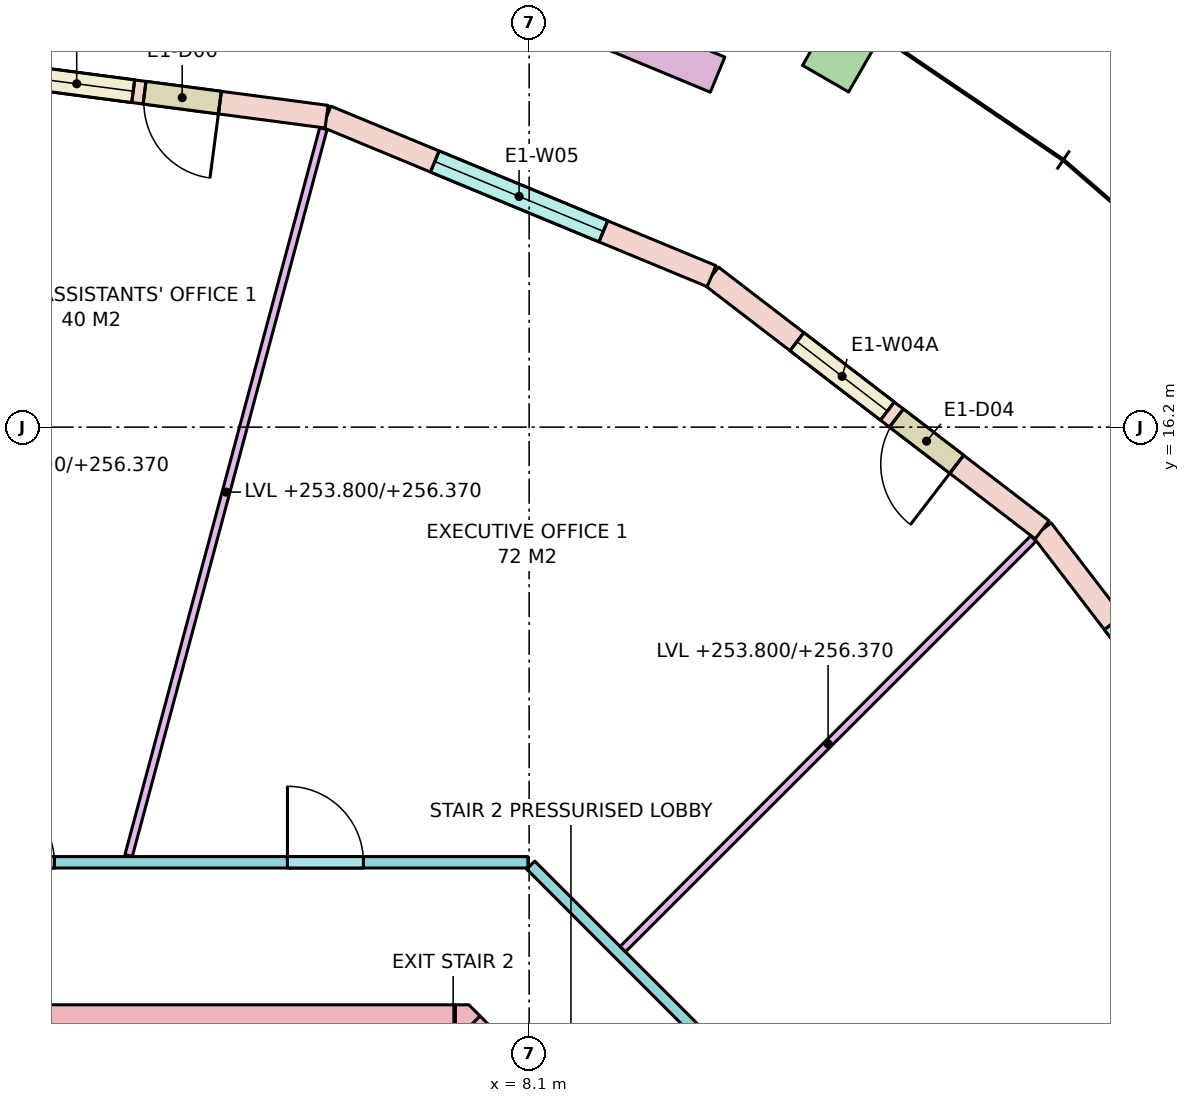
"""IFC4 building model, lengths in metres.
Left out: names, types, materials, properties, quantities, classifications, styles, units other than length and angle.
Written with IfcOpenShell. Run it as: python <this file> out.ifc"""

import sys

from ifc_helpers import new_model, si_unit, direction, frame, frame_2d, origin, origin_2d, place, context, subcontext, project, spatial, polyline, rectangle, outline, extrude, element, fill, save


model = new_model("IFC4")
c1 = context("Model", 3, precision=1e-05, world=origin(), true_north=direction((0.0, 1.0)))
c2 = subcontext(c1, "Body", "Model", "MODEL_VIEW")
j1 = project(units=[si_unit("LENGTHUNIT", "METRE"), si_unit("PLANEANGLEUNIT", "RADIAN")], contexts=[c1])
p1 = place(None, origin())
s1 = spatial("IfcSite", under=j1, at=p1, CompositionType="ELEMENT")
p2 = place(p1, origin())
s2 = spatial("IfcBuilding", under=s1, at=p2, CompositionType="ELEMENT")
p3 = place(p2, frame((0.0, 0.0, 253.8)))
s3 = spatial("IfcBuildingStorey", under=s2, at=p3, CompositionType="ELEMENT", Elevation=253.8)
p4 = place(p3, frame((12.25, 21.218, 0.0), z_axis=(0.0, 0.0, 1.0), x_axis=(-0.866025403784, 0.5, 0.0)))
e1 = element("IfcColumn", 1, at=p4, inside=s3, PredefinedType="COLUMN", context=c2, shape_type="SweptSolid", body=[
    extrude(rectangle(XDim=0.7, YDim=1.0, at=origin_2d()), origin(), (0.0, 0.0, 1.0), 3.7),
])
p5 = place(p3, frame((-7.13, 8.35, -0.28), z_axis=(0.0, 0.0, 1.0), x_axis=(1.0, 0.0, 0.0)))
e2 = element("IfcWall", 2, at=p5, inside=s3, PredefinedType="SHEAR", context=c2, shape_type="SweptSolid", body=[
    extrude(rectangle(XDim=14.26, YDim=0.5, at=frame_2d((7.13, 0.0))), origin(), (0.0, 0.0, 1.0), 3.7),
])
p6 = place(p5, frame((5.48, 0.0, 0.28)))
e3 = element("IfcOpeningElement", 3, at=p6, cuts=e2, PredefinedType="OPENING", context=c2, shape_type="SweptSolid", body=[
    extrude(rectangle(XDim=0.7, YDim=2.1, at=frame_2d((0.35, 1.05))), frame((0.0, 0.26, 0.0), z_axis=(0.0, -1.0, 0.0), x_axis=(1.0, 0.0, 0.0)), (0.0, 0.0, 1.0), 0.52),
])
p7 = place(p5, frame((6.53, 0.0, 0.28)))
e4 = element("IfcOpeningElement", 4, at=p7, cuts=e2, PredefinedType="OPENING", context=c2, shape_type="SweptSolid", body=[
    extrude(rectangle(XDim=0.85, YDim=2.1, at=frame_2d((0.425, 1.05))), frame((0.0, 0.26, 0.0), z_axis=(0.0, -1.0, 0.0), x_axis=(1.0, 0.0, 0.0)), (0.0, 0.0, 1.0), 0.52),
])
p8 = place(p5, frame((7.83, 0.0, 0.28)))
e5 = element("IfcOpeningElement", 5, at=p8, cuts=e2, PredefinedType="OPENING", context=c2, shape_type="SweptSolid", body=[
    extrude(rectangle(XDim=0.85, YDim=2.1, at=frame_2d((0.425, 1.05))), frame((0.0, 0.26, 0.0), z_axis=(0.0, -1.0, 0.0), x_axis=(1.0, 0.0, 0.0)), (0.0, 0.0, 1.0), 0.52),
])
p9 = place(p3, frame((7.277, 8.277, -0.28), z_axis=(0.0, 0.0, 1.0), x_axis=(0.707106781187, -0.707106781187, 0.0)))
e6 = element("IfcWall", 6, at=p9, inside=s3, PredefinedType="SHEAR", context=c2, shape_type="SweptSolid", body=[
    extrude(rectangle(XDim=4.243, YDim=0.5, at=frame_2d((2.121, 0.0))), origin(), (0.0, 0.0, 1.0), 3.7),
])
p10 = place(p9, frame((2.393, 0.0, 0.28)))
e7 = element("IfcOpeningElement", 7, at=p10, cuts=e6, PredefinedType="OPENING", context=c2, shape_type="SweptSolid", body=[
    extrude(rectangle(XDim=1.2, YDim=2.1, at=frame_2d((0.6, 1.05))), frame((0.0, 0.26, 0.0), z_axis=(0.0, -1.0, 0.0), x_axis=(1.0, 0.0, 0.0)), (0.0, 0.0, 1.0), 0.52),
])
p11 = place(p3, frame((0.0, 0.0, -0.28)))
e8 = element("IfcWall", 8, at=p11, inside=s3, PredefinedType="SHEAR", context=c2, shape_type="SweptSolid", body=[
    extrude(outline(polyline([(7.307, 8.6), (7.454, 8.454), (7.13, 8.13), (7.13, 8.6), (7.307, 8.6)])), origin(), (0.0, 0.0, 1.0), 3.7),
])
p12 = place(p3, frame((18.187, 10.5, 0.0), z_axis=(0.0, 0.0, 1.0), x_axis=(-0.608784891166, 0.793335336593, 0.0)))
e9 = element("IfcWall", 9, at=p12, inside=s3, PredefinedType="STANDARD", context=c2, shape_type="SweptSolid", body=[
    extrude(rectangle(XDim=5.482, YDim=0.3, at=frame_2d((2.741, 0.0))), origin(), (0.0, 0.0, 1.0), 3.42),
])
p13 = place(p12, frame((1.541, 0.0, 0.8)))
e10 = element("IfcOpeningElement", 10, at=p13, cuts=e9, PredefinedType="OPENING", context=c2, shape_type="SweptSolid", body=[
    extrude(rectangle(XDim=2.4, YDim=2.4, at=frame_2d((1.2, 1.2))), frame((0.0, 0.16, 0.0), z_axis=(0.0, -1.0, 0.0), x_axis=(1.0, 0.0, 0.0)), (0.0, 0.0, 1.0), 0.32),
])
p14 = place(p3, frame((14.849, 14.849, 0.0), z_axis=(0.0, 0.0, 1.0), x_axis=(-0.793335336593, 0.608784891166, 0.0)))
e11 = element("IfcWall", 11, at=p14, inside=s3, PredefinedType="STANDARD", context=c2, shape_type="SweptSolid", body=[
    extrude(rectangle(XDim=5.482, YDim=0.3, at=frame_2d((2.741, 0.0))), origin(), (0.0, 0.0, 1.0), 3.42),
])
p15 = place(p14, frame((1.416, 0.0, 0.0)))
e12 = element("IfcOpeningElement", 12, at=p15, cuts=e11, PredefinedType="OPENING", context=c2, shape_type="SweptSolid", body=[
    extrude(rectangle(XDim=1.0, YDim=2.4, at=frame_2d((0.5, 1.2))), frame((0.0, 0.16, 0.0), z_axis=(0.0, -1.0, 0.0), x_axis=(1.0, 0.0, 0.0)), (0.0, 0.0, 1.0), 0.32),
])
p16 = place(p14, frame((2.566, 0.0, 0.8)))
e13 = element("IfcOpeningElement", 13, at=p16, cuts=e11, PredefinedType="OPENING", context=c2, shape_type="SweptSolid", body=[
    extrude(rectangle(XDim=1.5, YDim=2.4, at=frame_2d((0.75, 1.2))), frame((0.0, 0.16, 0.0), z_axis=(0.0, -1.0, 0.0), x_axis=(1.0, 0.0, 0.0)), (0.0, 0.0, 1.0), 0.32),
])
p17 = place(p3, frame((10.5, 18.187, 0.0), z_axis=(0.0, 0.0, 1.0), x_axis=(-0.923877333662, 0.382688740813, 0.0)))
e14 = element("IfcWall", 14, at=p17, inside=s3, PredefinedType="STANDARD", context=c2, shape_type="SweptSolid", body=[
    extrude(rectangle(XDim=5.482, YDim=0.3, at=frame_2d((2.741, 0.0))), origin(), (0.0, 0.0, 1.0), 3.42),
])
p18 = place(p17, frame((1.541, 0.0, 0.8)))
e15 = element("IfcOpeningElement", 15, at=p18, cuts=e14, PredefinedType="OPENING", context=c2, shape_type="SweptSolid", body=[
    extrude(rectangle(XDim=2.4, YDim=2.4, at=frame_2d((1.2, 1.2))), frame((0.0, 0.16, 0.0), z_axis=(0.0, -1.0, 0.0), x_axis=(1.0, 0.0, 0.0)), (0.0, 0.0, 1.0), 0.32),
])
p19 = place(p3, frame((5.435, 20.284, 0.0), z_axis=(0.0, 0.0, 1.0), x_axis=(-0.991444743541, 0.130527087244, 0.0)))
e16 = element("IfcWall", 16, at=p19, inside=s3, PredefinedType="STANDARD", context=c2, shape_type="SweptSolid", body=[
    extrude(rectangle(XDim=5.482, YDim=0.3, at=frame_2d((2.741, 0.0))), origin(), (0.0, 0.0, 1.0), 3.42),
])
p20 = place(p19, frame((1.416, 0.0, 0.0)))
e17 = element("IfcOpeningElement", 17, at=p20, cuts=e16, PredefinedType="OPENING", context=c2, shape_type="SweptSolid", body=[
    extrude(rectangle(XDim=1.0, YDim=2.4, at=frame_2d((0.5, 1.2))), frame((0.0, 0.16, 0.0), z_axis=(0.0, -1.0, 0.0), x_axis=(1.0, 0.0, 0.0)), (0.0, 0.0, 1.0), 0.32),
])
p21 = place(p19, frame((2.566, 0.0, 0.8)))
e18 = element("IfcOpeningElement", 18, at=p21, cuts=e16, PredefinedType="OPENING", context=c2, shape_type="SweptSolid", body=[
    extrude(rectangle(XDim=1.5, YDim=2.4, at=frame_2d((0.75, 1.2))), frame((0.0, 0.16, 0.0), z_axis=(0.0, -1.0, 0.0), x_axis=(1.0, 0.0, 0.0)), (0.0, 0.0, 1.0), 0.32),
])
p22 = place(p3, frame((10.58, 20.838, 0.0), z_axis=(0.0, 0.0, 1.0), x_axis=(-0.923909393783, 0.382611332921, 0.0)))
e19 = element("IfcWall", 19, at=p22, inside=s3, PredefinedType="PARAPET", context=c2, shape_type="SweptSolid", body=[
    extrude(rectangle(XDim=3.6, YDim=0.5, at=frame_2d((1.8, 0.0))), origin(), (0.0, 0.0, 1.0), 0.9),
])
p23 = place(p3, frame((-8.084, 10.475, 0.0), z_axis=(0.0, 0.0, 1.0), x_axis=(1.0, 0.0, 0.0)))
e20 = element("IfcWall", 20, at=p23, inside=s3, PredefinedType="PARTITIONING", context=c2, shape_type="SweptSolid", body=[
    extrude(rectangle(XDim=16.167, YDim=0.15, at=frame_2d((8.084, 0.0))), origin(), (0.0, 0.0, 1.0), 2.57),
])
p24 = place(p23, frame((13.004, 0.0, 0.0)))
e21 = element("IfcOpeningElement", 21, at=p24, cuts=e20, PredefinedType="OPENING", context=c2, shape_type="SweptSolid", body=[
    extrude(rectangle(XDim=1.0, YDim=2.1, at=frame_2d((0.5, 1.05))), frame((0.0, 0.085, 0.0), z_axis=(0.0, -1.0, 0.0), x_axis=(1.0, 0.0, 0.0)), (0.0, 0.0, 1.0), 0.17),
])
p25 = place(p23, frame((9.038, 0.0, 0.0)))
e22 = element("IfcOpeningElement", 22, at=p25, cuts=e20, PredefinedType="OPENING", context=c2, shape_type="SweptSolid", body=[
    extrude(rectangle(XDim=0.9, YDim=2.1, at=frame_2d((0.45, 1.05))), frame((0.0, 0.085, 0.0), z_axis=(0.0, -1.0, 0.0), x_axis=(1.0, 0.0, 0.0)), (0.0, 0.0, 1.0), 0.17),
])
p26 = place(p23, frame((4.556, 0.0, 0.0)))
e23 = element("IfcOpeningElement", 23, at=p26, cuts=e20, PredefinedType="OPENING", context=c2, shape_type="SweptSolid", body=[
    extrude(rectangle(XDim=1.0, YDim=2.1, at=frame_2d((0.5, 1.05))), frame((0.0, 0.085, 0.0), z_axis=(0.0, -1.0, 0.0), x_axis=(1.0, 0.0, 0.0)), (0.0, 0.0, 1.0), 0.17),
])
p27 = place(p3, frame((8.121, 10.438, 0.0), z_axis=(0.0, 0.0, 1.0), x_axis=(0.707106781187, -0.707106781187, 0.0)))
e24 = element("IfcWall", 24, at=p27, inside=s3, PredefinedType="PARTITIONING", context=c2, shape_type="SweptSolid", body=[
    extrude(rectangle(XDim=6.105, YDim=0.15, at=frame_2d((3.053, 0.0))), origin(), (0.0, 0.0, 1.0), 2.57),
])
p28 = place(p3, frame((9.333, 9.333, 0.0), z_axis=(0.0, 0.0, 1.0), x_axis=(0.707106781187, 0.707106781187, 0.0)))
e25 = element("IfcWall", 25, at=p28, inside=s3, PredefinedType="PARTITIONING", context=c2, shape_type="SweptSolid", body=[
    extrude(rectangle(XDim=7.639, YDim=0.1, at=frame_2d((3.819, 0.0))), origin(), (0.0, 0.0, 1.0), 2.57),
])
p29 = place(p3, frame((2.831, 10.564, 0.0), z_axis=(0.0, 0.0, 1.0), x_axis=(0.258795254151, 0.965932200741, 0.0)))
e26 = element("IfcWall", 26, at=p29, inside=s3, PredefinedType="PARTITIONING", context=c2, shape_type="SweptSolid", body=[
    extrude(rectangle(XDim=9.9, YDim=0.1, at=frame_2d((4.95, 0.0))), origin(), (0.0, 0.0, 1.0), 2.57),
])
p30 = place(p15, origin())
e27 = element("IfcDoor", 27, at=p30, inside=s3, OperationType="SINGLE_SWING_LEFT", PredefinedType="DOOR", context=c2, shape_type="SweptSolid", body=[
    extrude(rectangle(XDim=1.0, YDim=2.4, at=frame_2d((0.5, 1.2))), frame((0.0, 0.025, 0.0), z_axis=(0.0, -1.0, 0.0), x_axis=(1.0, 0.0, 0.0)), (0.0, 0.0, 1.0), 0.05),
])
fill(e12, e27)
p31 = place(p16, origin())
e28 = element("IfcWindow", 28, at=p31, inside=s3, PartitioningType="SINGLE_PANEL", PredefinedType="WINDOW", context=c2, shape_type="SweptSolid", body=[
    extrude(rectangle(XDim=1.5, YDim=2.4, at=frame_2d((0.75, 1.2))), frame((0.0, 0.03, 0.0), z_axis=(0.0, -1.0, 0.0), x_axis=(1.0, 0.0, 0.0)), (0.0, 0.0, 1.0), 0.06),
])
fill(e13, e28)
p32 = place(p18, origin())
e29 = element("IfcWindow", 29, at=p32, inside=s3, PartitioningType="SINGLE_PANEL", PredefinedType="WINDOW", context=c2, shape_type="SweptSolid", body=[
    extrude(rectangle(XDim=2.4, YDim=2.4, at=frame_2d((1.2, 1.2))), frame((0.0, 0.03, 0.0), z_axis=(0.0, -1.0, 0.0), x_axis=(1.0, 0.0, 0.0)), (0.0, 0.0, 1.0), 0.06),
])
fill(e15, e29)
p33 = place(p20, origin())
e30 = element("IfcDoor", 30, at=p33, inside=s3, OperationType="SINGLE_SWING_LEFT", PredefinedType="DOOR", context=c2, shape_type="SweptSolid", body=[
    extrude(rectangle(XDim=1.0, YDim=2.4, at=frame_2d((0.5, 1.2))), frame((0.0, 0.025, 0.0), z_axis=(0.0, -1.0, 0.0), x_axis=(1.0, 0.0, 0.0)), (0.0, 0.0, 1.0), 0.05),
])
fill(e17, e30)
p34 = place(p21, origin())
e31 = element("IfcWindow", 31, at=p34, inside=s3, PartitioningType="SINGLE_PANEL", PredefinedType="WINDOW", context=c2, shape_type="SweptSolid", body=[
    extrude(rectangle(XDim=1.5, YDim=2.4, at=frame_2d((0.75, 1.2))), frame((0.0, 0.03, 0.0), z_axis=(0.0, -1.0, 0.0), x_axis=(1.0, 0.0, 0.0)), (0.0, 0.0, 1.0), 0.06),
])
fill(e18, e31)
p35 = place(p24, origin())
e32 = element("IfcDoor", 32, at=p35, inside=s3, OperationType="SINGLE_SWING_LEFT", PredefinedType="DOOR", context=c2, shape_type="SweptSolid", body=[
    extrude(rectangle(XDim=1.0, YDim=2.1, at=frame_2d((0.5, 1.05))), frame((0.0, 0.025, 0.0), z_axis=(0.0, -1.0, 0.0), x_axis=(1.0, 0.0, 0.0)), (0.0, 0.0, 1.0), 0.05),
])
fill(e21, e32)
p36 = place(p25, origin())
e33 = element("IfcDoor", 33, at=p36, inside=s3, OperationType="SINGLE_SWING_LEFT", PredefinedType="DOOR", context=c2, shape_type="SweptSolid", body=[
    extrude(rectangle(XDim=0.9, YDim=2.1, at=frame_2d((0.45, 1.05))), frame((0.0, 0.025, 0.0), z_axis=(0.0, -1.0, 0.0), x_axis=(1.0, 0.0, 0.0)), (0.0, 0.0, 1.0), 0.05),
])
fill(e22, e33)
save(model, sys.argv[1])
